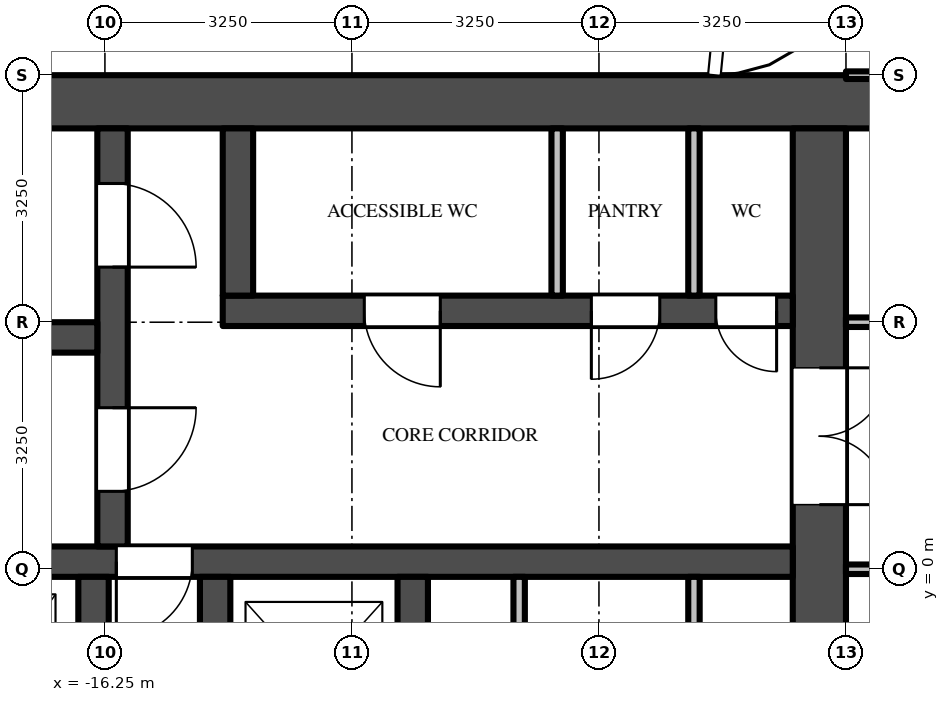
"""IFC4 building model, lengths in metres.
Left out: names, types, materials, properties, quantities, classifications, styles, units other than length and angle.
Written with IfcOpenShell. Run it as: python <this file> out.ifc"""

import sys

from ifc_helpers import new_model, si_unit, direction, frame, frame_2d, origin, place, context, subcontext, project, spatial, rectangle, extrude, source, transform, mapped, element, fill, save


model = new_model("IFC4")
c1 = context("Model", 3, precision=1e-05, world=origin(), true_north=direction((0.0, 1.0)))
c2 = subcontext(c1, "Body", "Model", "MODEL_VIEW")
j1 = project(units=[si_unit("LENGTHUNIT", "METRE"), si_unit("PLANEANGLEUNIT", "RADIAN")], contexts=[c1])
p1 = place(None, origin())
s1 = spatial("IfcSite", under=j1, at=p1, CompositionType="ELEMENT")
p2 = place(p1, origin())
s2 = spatial("IfcBuilding", under=s1, at=p2, CompositionType="ELEMENT")
p3 = place(p2, frame((0.0, 0.0, 302.8)))
s3 = spatial("IfcBuildingStorey", under=s2, at=p3, CompositionType="ELEMENT", Elevation=302.8)
m1 = source(origin(), c2, "Body", "SweptSolid", [
    extrude(rectangle(XDim=16.65, YDim=0.7, at=frame_2d((8.325, 0.0))), origin(), (0.0, 0.0, 1.0), 3.7),
])
p4 = place(p3, frame((-6.1, 6.15, 0.0), z_axis=(0.0, 0.0, 1.0), x_axis=(-1.0, 0.0, 0.0)))
e1 = element("IfcWall", 1, at=p4, inside=s3, PredefinedType="SHEAR", context=c2, shape_type="MappedRepresentation", body=[
    mapped(m1, transform((0.0, 0.0, 0.0))),
])
m2 = source(origin(), c2, "Body", "SweptSolid", [
    extrude(rectangle(XDim=9.05, YDim=0.7, at=frame_2d((4.525, 0.0))), origin(), (0.0, 0.0, 1.0), 3.7),
])
p5 = place(p3, frame((-6.85, 5.8, 0.0), z_axis=(0.0, 0.0, 1.0), x_axis=(0.0, -1.0, 0.0)))
e2 = element("IfcWall", 2, at=p5, inside=s3, PredefinedType="SHEAR", context=c2, shape_type="MappedRepresentation", body=[
    mapped(m2, transform((0.0, 0.0, 0.0))),
])
m3 = source(origin(), c2, "Body", "SweptSolid", [
    extrude(rectangle(XDim=1.8, YDim=2.1, at=frame_2d((0.9, 1.05))), frame((0.0, 0.36, 0.0), z_axis=(0.0, -1.0, 0.0), x_axis=(1.0, 0.0, 0.0)), (0.0, 0.0, 1.0), 0.72),
])
p6 = place(p5, frame((3.15, 0.0, 0.0)))
e3 = element("IfcOpeningElement", 3, at=p6, cuts=e2, PredefinedType="OPENING", context=c2, shape_type="MappedRepresentation", body=[
    mapped(m3, transform((0.0, 0.0, 0.0))),
])
m4 = source(origin(), c2, "Body", "SweptSolid", [
    extrude(rectangle(XDim=7.5, YDim=0.4, at=frame_2d((3.75, 0.0))), origin(), (0.0, 0.0, 1.0), 3.7),
])
p7 = place(p3, frame((-7.2, 3.4, 0.0), z_axis=(0.0, 0.0, 1.0), x_axis=(-1.0, 0.0, 0.0)))
e4 = element("IfcWall", 4, at=p7, inside=s3, PredefinedType="SHEAR", context=c2, shape_type="MappedRepresentation", body=[
    mapped(m4, transform((0.0, 0.0, 0.0))),
])
m5 = source(origin(), c2, "Body", "SweptSolid", [
    extrude(rectangle(XDim=0.8, YDim=2.1, at=frame_2d((0.4, 1.05))), frame((0.0, 0.21, 0.0), z_axis=(0.0, -1.0, 0.0), x_axis=(1.0, 0.0, 0.0)), (0.0, 0.0, 1.0), 0.42),
])
p8 = place(p7, frame((0.212, 0.0, 0.0)))
e5 = element("IfcOpeningElement", 5, at=p8, cuts=e4, PredefinedType="OPENING", context=c2, shape_type="MappedRepresentation", body=[
    mapped(m5, transform((0.0, 0.0, 0.0))),
])
m6 = source(origin(), c2, "Body", "SweptSolid", [
    extrude(rectangle(XDim=0.9, YDim=2.1, at=frame_2d((0.45, 1.05))), frame((0.0, 0.21, 0.0), z_axis=(0.0, -1.0, 0.0), x_axis=(1.0, 0.0, 0.0)), (0.0, 0.0, 1.0), 0.42),
])
p9 = place(p7, frame((1.75, 0.0, 0.0)))
e6 = element("IfcOpeningElement", 6, at=p9, cuts=e4, PredefinedType="OPENING", context=c2, shape_type="MappedRepresentation", body=[
    mapped(m6, transform((0.0, 0.0, 0.0))),
])
m7 = source(origin(), c2, "Body", "SweptSolid", [
    extrude(rectangle(XDim=1.0, YDim=2.1, at=frame_2d((0.5, 1.05))), frame((0.0, 0.21, 0.0), z_axis=(0.0, -1.0, 0.0), x_axis=(1.0, 0.0, 0.0)), (0.0, 0.0, 1.0), 0.42),
])
p10 = place(p7, frame((4.637, 0.0, 0.0)))
e7 = element("IfcOpeningElement", 7, at=p10, cuts=e4, PredefinedType="OPENING", context=c2, shape_type="MappedRepresentation", body=[
    mapped(m7, transform((0.0, 0.0, 0.0))),
])
m8 = source(origin(), c2, "Body", "SweptSolid", [
    extrude(rectangle(XDim=14.85, YDim=0.4, at=frame_2d((7.425, 0.0))), origin(), (0.0, 0.0, 1.0), 3.7),
])
p11 = place(p3, frame((-7.2, 0.1, 0.0), z_axis=(0.0, 0.0, 1.0), x_axis=(-1.0, 0.0, 0.0)))
e8 = element("IfcWall", 8, at=p11, inside=s3, PredefinedType="SHEAR", context=c2, shape_type="MappedRepresentation", body=[
    mapped(m8, transform((0.0, 0.0, 0.0))),
])
p12 = place(p11, frame((7.9, 0.0, 0.0)))
e9 = element("IfcOpeningElement", 9, at=p12, cuts=e8, PredefinedType="OPENING", context=c2, shape_type="MappedRepresentation", body=[
    mapped(m7, transform((0.0, 0.0, 0.0))),
])
m9 = source(origin(), c2, "Body", "SweptSolid", [
    extrude(rectangle(XDim=5.5, YDim=0.4, at=frame_2d((2.75, 0.0))), origin(), (0.0, 0.0, 1.0), 3.7),
])
p13 = place(p3, frame((-16.15, 5.8, 0.0), z_axis=(0.0, 0.0, 1.0), x_axis=(0.0, -1.0, 0.0)))
e10 = element("IfcWall", 10, at=p13, inside=s3, PredefinedType="SHEAR", context=c2, shape_type="MappedRepresentation", body=[
    mapped(m9, transform((0.0, 0.0, 0.0))),
])
m10 = source(origin(), c2, "Body", "SweptSolid", [
    extrude(rectangle(XDim=1.1, YDim=2.1, at=frame_2d((0.55, 1.05))), frame((0.0, 0.21, 0.0), z_axis=(0.0, -1.0, 0.0), x_axis=(1.0, 0.0, 0.0)), (0.0, 0.0, 1.0), 0.42),
])
p14 = place(p13, frame((0.725, 0.0, 0.0)))
e11 = element("IfcOpeningElement", 11, at=p14, cuts=e10, PredefinedType="OPENING", context=c2, shape_type="MappedRepresentation", body=[
    mapped(m10, transform((0.0, 0.0, 0.0))),
])
p15 = place(p13, frame((3.675, 0.0, 0.0)))
e12 = element("IfcOpeningElement", 12, at=p15, cuts=e10, PredefinedType="OPENING", context=c2, shape_type="MappedRepresentation", body=[
    mapped(m10, transform((0.0, 0.0, 0.0))),
])
m11 = source(origin(), c2, "Body", "SweptSolid", [
    extrude(rectangle(XDim=5.7, YDim=0.4, at=frame_2d((2.85, 0.0))), origin(), (0.0, 0.0, 1.0), 3.7),
])
p16 = place(p3, frame((-16.35, 3.05, 0.0), z_axis=(0.0, 0.0, 1.0), x_axis=(-1.0, 0.0, 0.0)))
e13 = element("IfcWall", 13, at=p16, inside=s3, PredefinedType="SHEAR", context=c2, shape_type="MappedRepresentation", body=[
    mapped(m11, transform((0.0, 0.0, 0.0))),
])
m12 = source(origin(), c2, "Body", "SweptSolid", [
    extrude(rectangle(XDim=2.2, YDim=0.4, at=frame_2d((1.1, 0.0))), origin(), (0.0, 0.0, 1.0), 3.7),
])
p17 = place(p3, frame((-14.5, 5.8, 0.0), z_axis=(0.0, 0.0, 1.0), x_axis=(0.0, -1.0, 0.0)))
e14 = element("IfcWall", 14, at=p17, inside=s3, PredefinedType="SHEAR", context=c2, shape_type="MappedRepresentation", body=[
    mapped(m12, transform((0.0, 0.0, 0.0))),
])
m13 = source(origin(), c2, "Body", "SweptSolid", [
    extrude(rectangle(XDim=2.45, YDim=0.4, at=frame_2d((1.225, 0.0))), origin(), (0.0, 0.0, 1.0), 3.7),
])
for number, where, z_axis, x_axis in (
    (15, (-12.2, -0.1, 0.0), (0.0, 0.0, 1.0), (0.0, -1.0, 0.0)),
    (16, (-14.8, -0.1, 0.0), (0.0, 0.0, 1.0), (0.0, -1.0, 0.0)),
    (17, (-16.4, -0.1, 0.0), (0.0, 0.0, 1.0), (0.0, -1.0, 0.0)),
):
    element("IfcWall", number, at=place(p3, frame(where, z_axis=z_axis, x_axis=x_axis)), inside=s3, PredefinedType="SHEAR", context=c2, shape_type="MappedRepresentation", body=[
        mapped(m13, transform((0.0, 0.0, 0.0))),
    ])
m14 = source(origin(), c2, "Body", "SweptSolid", [
    extrude(rectangle(XDim=2.2, YDim=0.15, at=frame_2d((1.1, 0.0))), origin(), (0.0, 0.0, 1.0), 3.7),
])
for number, where, z_axis, x_axis in (
    (18, (-8.5, 5.8, 0.0), (0.0, 0.0, 1.0), (0.0, -1.0, 0.0)),
    (19, (-10.3, 5.8, 0.0), (0.0, 0.0, 1.0), (0.0, -1.0, 0.0)),
):
    element("IfcWall", number, at=place(p3, frame(where, z_axis=z_axis, x_axis=x_axis)), inside=s3, PredefinedType="PARTITIONING", context=c2, shape_type="MappedRepresentation", body=[
        mapped(m14, transform((0.0, 0.0, 0.0))),
    ])
m15 = source(origin(), c2, "Body", "SweptSolid", [
    extrude(rectangle(XDim=2.45, YDim=0.15, at=frame_2d((1.225, 0.0))), origin(), (0.0, 0.0, 1.0), 3.7),
])
for number, where, z_axis, x_axis in (
    (20, (-8.5, -0.1, 0.0), (0.0, 0.0, 1.0), (0.0, -1.0, 0.0)),
    (21, (-10.8, -0.1, 0.0), (0.0, 0.0, 1.0), (0.0, -1.0, 0.0)),
):
    element("IfcWall", number, at=place(p3, frame(where, z_axis=z_axis, x_axis=x_axis)), inside=s3, PredefinedType="PARTITIONING", context=c2, shape_type="MappedRepresentation", body=[
        mapped(m15, transform((0.0, 0.0, 0.0))),
    ])
m16 = source(origin(), c2, "Body", "SweptSolid", [
    extrude(rectangle(XDim=5.363, YDim=0.125, at=frame_2d((2.681, 0.0))), origin(), (0.0, 0.0, 1.0), 2.997),
])
p18 = place(p3, frame((-1.137, 0.0, 0.0), z_axis=(0.0, 0.0, 1.0), x_axis=(-1.0, 0.0, 0.0)))
e22 = element("IfcWall", 22, at=p18, inside=s3, PredefinedType="PARTITIONING", context=c2, shape_type="MappedRepresentation", body=[
    mapped(m16, transform((0.0, 0.0, 0.0))),
])
p19 = place(p3, frame((-6.5, 3.25, 0.0), z_axis=(0.0, 0.0, 1.0), x_axis=(1.0, 0.0, 0.0)))
e23 = element("IfcWall", 23, at=p19, inside=s3, PredefinedType="PARTITIONING", context=c2, shape_type="MappedRepresentation", body=[
    mapped(m16, transform((0.0, 0.0, 0.0))),
])
m17 = source(origin(), c2, "Body", "SweptSolid", [
    extrude(rectangle(XDim=1.0, YDim=2.1, at=frame_2d((0.5, 1.05))), frame((0.0, 0.073, 0.0), z_axis=(0.0, -1.0, 0.0), x_axis=(1.0, 0.0, 0.0)), (0.0, 0.0, 1.0), 0.145),
])
p20 = place(p19, frame((1.3, 0.0, 0.0)))
e24 = element("IfcOpeningElement", 24, at=p20, cuts=e23, PredefinedType="OPENING", context=c2, shape_type="MappedRepresentation", body=[
    mapped(m17, transform((0.0, 0.0, 0.0))),
])
m18 = source(origin(), c2, "Body", "SweptSolid", [
    extrude(rectangle(XDim=5.363, YDim=0.1, at=frame_2d((2.681, 0.0))), origin(), (0.0, 0.0, 1.0), 2.78),
])
p21 = place(p3, frame((-6.5, 6.5, 0.0), z_axis=(0.0, 0.0, 1.0), x_axis=(1.0, 0.0, 0.0)))
e25 = element("IfcWall", 25, at=p21, inside=s3, PredefinedType="PARTITIONING", context=c2, shape_type="MappedRepresentation", body=[
    mapped(m18, transform((0.0, 0.0, 0.0))),
])
m19 = source(origin(), c2, "Body", "SweptSolid", [
    extrude(rectangle(XDim=1.8, YDim=2.1, at=frame_2d((0.9, 1.05))), frame((0.0, -0.275, 0.0), z_axis=(0.0, -1.0, 0.0), x_axis=(1.0, 0.0, 0.0)), (0.0, 0.0, 1.0), 0.05),
])
p22 = place(p6, origin())
e26 = element("IfcDoor", 26, at=p22, inside=s3, OperationType="DOUBLE_DOOR_SINGLE_SWING", PredefinedType="DOOR", context=c2, shape_type="MappedRepresentation", body=[
    mapped(m19, transform((0.0, 0.0, 0.0))),
])
fill(e3, e26)
m20 = source(origin(), c2, "Body", "SweptSolid", [
    extrude(rectangle(XDim=1.1, YDim=2.1, at=frame_2d((0.55, 1.05))), frame((0.0, 0.025, 0.0), z_axis=(0.0, -1.0, 0.0), x_axis=(1.0, 0.0, 0.0)), (0.0, 0.0, 1.0), 0.05),
])
p23 = place(p14, origin())
e27 = element("IfcDoor", 27, at=p23, inside=s3, OperationType="SINGLE_SWING_RIGHT", PredefinedType="DOOR", context=c2, shape_type="MappedRepresentation", body=[
    mapped(m20, transform((0.0, 0.0, 0.0))),
])
fill(e11, e27)
p24 = place(p15, origin())
e28 = element("IfcDoor", 28, at=p24, inside=s3, OperationType="SINGLE_SWING_LEFT", PredefinedType="DOOR", context=c2, shape_type="MappedRepresentation", body=[
    mapped(m20, transform((0.0, 0.0, 0.0))),
])
fill(e12, e28)
m21 = source(origin(), c2, "Body", "SweptSolid", [
    extrude(rectangle(XDim=1.0, YDim=2.1, at=frame_2d((0.5, 1.05))), frame((0.0, 0.025, 0.0), z_axis=(0.0, -1.0, 0.0), x_axis=(1.0, 0.0, 0.0)), (0.0, 0.0, 1.0), 0.05),
])
p25 = place(p12, origin())
e29 = element("IfcDoor", 29, at=p25, inside=s3, OperationType="SINGLE_SWING_RIGHT", PredefinedType="DOOR", context=c2, shape_type="MappedRepresentation", body=[
    mapped(m21, transform((0.0, 0.0, 0.0))),
])
fill(e9, e29)
m22 = source(origin(), c2, "Body", "SweptSolid", [
    extrude(rectangle(XDim=0.8, YDim=2.1, at=frame_2d((0.4, 1.05))), frame((0.0, 0.025, 0.0), z_axis=(0.0, -1.0, 0.0), x_axis=(1.0, 0.0, 0.0)), (0.0, 0.0, 1.0), 0.05),
])
p26 = place(p8, origin())
e30 = element("IfcDoor", 30, at=p26, inside=s3, OperationType="SINGLE_SWING_LEFT", PredefinedType="DOOR", context=c2, shape_type="MappedRepresentation", body=[
    mapped(m22, transform((0.0, 0.0, 0.0))),
])
fill(e5, e30)
m23 = source(origin(), c2, "Body", "SweptSolid", [
    extrude(rectangle(XDim=0.9, YDim=2.1, at=frame_2d((0.45, 1.05))), frame((0.0, 0.025, 0.0), z_axis=(0.0, -1.0, 0.0), x_axis=(1.0, 0.0, 0.0)), (0.0, 0.0, 1.0), 0.05),
])
p27 = place(p9, origin())
e31 = element("IfcDoor", 31, at=p27, inside=s3, OperationType="SINGLE_SWING_RIGHT", PredefinedType="DOOR", context=c2, shape_type="MappedRepresentation", body=[
    mapped(m23, transform((0.0, 0.0, 0.0))),
])
fill(e6, e31)
p28 = place(p10, origin())
e32 = element("IfcDoor", 32, at=p28, inside=s3, OperationType="SINGLE_SWING_LEFT", PredefinedType="DOOR", context=c2, shape_type="MappedRepresentation", body=[
    mapped(m21, transform((0.0, 0.0, 0.0))),
])
fill(e7, e32)
save(model, sys.argv[1])
